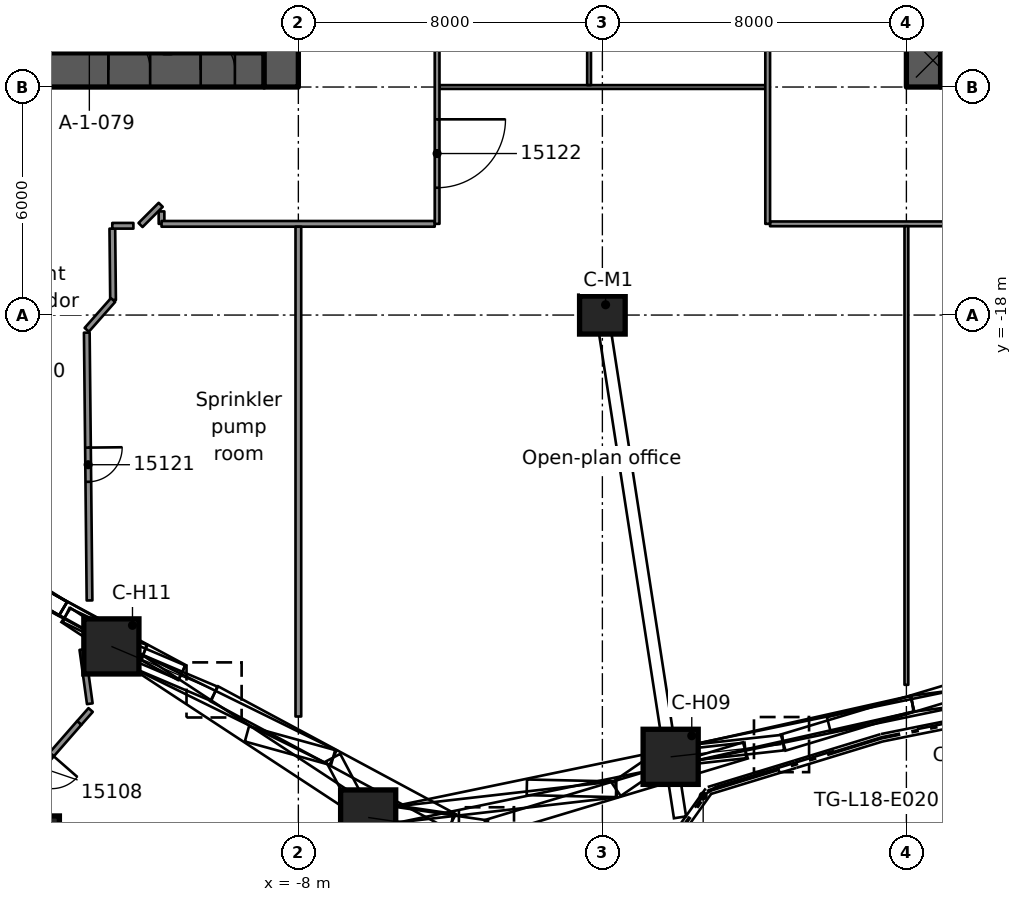
"""IFC4 building model, lengths in metres.
Left out: names, types, materials, properties, quantities, classifications, styles, units other than length and angle.
Written with IfcOpenShell. Run it as: python <this file> out.ifc"""

import sys

from ifc_helpers import new_model, si_unit, direction, frame, frame_2d, origin, origin_2d, place, context, subcontext, project, spatial, rectangle, extrude, element, fill, save


model = new_model("IFC4")
c1 = context("Model", 3, precision=1e-05, world=origin(), true_north=direction((0.0, 1.0)))
c2 = subcontext(c1, "Body", "Model", "MODEL_VIEW")
j1 = project(units=[si_unit("LENGTHUNIT", "METRE"), si_unit("PLANEANGLEUNIT", "RADIAN")], contexts=[c1])
p1 = place(None, origin())
s1 = spatial("IfcSite", under=j1, at=p1, CompositionType="ELEMENT")
p2 = place(p1, origin())
s2 = spatial("IfcBuilding", under=s1, at=p2, CompositionType="ELEMENT")
p3 = place(p2, frame((0.0, 0.0, 76.3)))
s3 = spatial("IfcBuildingStorey", under=s2, at=p3, CompositionType="ELEMENT", Elevation=76.3)
p4 = place(p3, frame((-18.1, -11.55, 0.0), z_axis=(0.0, 0.0, 1.0), x_axis=(1.0, 0.0, 0.0)))
e1 = element("IfcWall", 1, at=p4, inside=s3, PredefinedType="SHEAR", context=c2, shape_type="SweptSolid", body=[
    extrude(rectangle(XDim=9.2, YDim=0.9, at=frame_2d((4.6, 0.0))), origin(), (0.0, 0.0, 1.0), 4.4),
])
p5 = place(p4, frame((5.1, 0.0, 0.0)))
e2 = element("IfcOpeningElement", 2, at=p5, cuts=e1, PredefinedType="OPENING", context=c2, shape_type="SweptSolid", body=[
    extrude(rectangle(XDim=1.1, YDim=2.1, at=frame_2d((0.55, 1.05))), frame((0.0, 0.46, 0.0), z_axis=(0.0, -1.0, 0.0), x_axis=(1.0, 0.0, 0.0)), (0.0, 0.0, 1.0), 0.92),
])
p6 = place(p4, frame((7.53, 0.0, 0.0)))
e3 = element("IfcOpeningElement", 3, at=p6, cuts=e1, PredefinedType="OPENING", context=c2, shape_type="SweptSolid", body=[
    extrude(rectangle(XDim=0.9, YDim=2.1, at=frame_2d((0.45, 1.05))), frame((0.0, 0.46, 0.0), z_axis=(0.0, -1.0, 0.0), x_axis=(1.0, 0.0, 0.0)), (0.0, 0.0, 1.0), 0.92),
])
p7 = place(p3, frame((-8.45, -12.0, 0.0), z_axis=(0.0, 0.0, 1.0), x_axis=(0.0, 1.0, 0.0)))
e4 = element("IfcWall", 4, at=p7, inside=s3, PredefinedType="SHEAR", context=c2, shape_type="SweptSolid", body=[
    extrude(rectangle(XDim=24.0, YDim=0.9, at=frame_2d((12.0, 0.0))), origin(), (0.0, 0.0, 1.0), 4.4),
])
p8 = place(p7, frame((9.6, 0.0, 0.0)))
e5 = element("IfcOpeningElement", 5, at=p8, cuts=e4, PredefinedType="OPENING", context=c2, shape_type="SweptSolid", body=[
    extrude(rectangle(XDim=1.8, YDim=2.1, at=frame_2d((0.9, 1.05))), frame((0.0, 0.46, 0.0), z_axis=(0.0, -1.0, 0.0), x_axis=(1.0, 0.0, 0.0)), (0.0, 0.0, 1.0), 0.92),
])
p9 = place(p7, frame((5.9, 0.0, 0.0)))
e6 = element("IfcOpeningElement", 6, at=p9, cuts=e4, PredefinedType="OPENING", context=c2, shape_type="SweptSolid", body=[
    extrude(rectangle(XDim=1.8, YDim=2.1, at=frame_2d((0.9, 1.05))), frame((0.0, 0.46, 0.0), z_axis=(0.0, -1.0, 0.0), x_axis=(1.0, 0.0, 0.0)), (0.0, 0.0, 1.0), 0.92),
])
p10 = place(p7, frame((12.6, 0.0, 0.0)))
e7 = element("IfcOpeningElement", 7, at=p10, cuts=e4, PredefinedType="OPENING", context=c2, shape_type="SweptSolid", body=[
    extrude(rectangle(XDim=1.8, YDim=2.1, at=frame_2d((0.9, 1.05))), frame((0.0, 0.46, 0.0), z_axis=(0.0, -1.0, 0.0), x_axis=(1.0, 0.0, 0.0)), (0.0, 0.0, 1.0), 0.92),
])
p11 = place(p7, frame((19.65, 0.0, 0.0)))
e8 = element("IfcOpeningElement", 8, at=p11, cuts=e4, PredefinedType="OPENING", context=c2, shape_type="SweptSolid", body=[
    extrude(rectangle(XDim=1.1, YDim=2.1, at=frame_2d((0.55, 1.05))), frame((0.0, 0.46, 0.0), z_axis=(0.0, -1.0, 0.0), x_axis=(1.0, 0.0, 0.0)), (0.0, 0.0, 1.0), 0.92),
])
p12 = place(p7, frame((2.2, 0.0, 0.0)))
e9 = element("IfcOpeningElement", 9, at=p12, cuts=e4, PredefinedType="OPENING", context=c2, shape_type="SweptSolid", body=[
    extrude(rectangle(XDim=0.8, YDim=2.1, at=frame_2d((0.4, 1.05))), frame((0.0, 0.46, 0.0), z_axis=(0.0, -1.0, 0.0), x_axis=(1.0, 0.0, 0.0)), (0.0, 0.0, 1.0), 0.92),
])
p13 = place(p3, frame((8.9, -11.55, 0.0), z_axis=(0.0, 0.0, 1.0), x_axis=(1.0, 0.0, 0.0)))
e10 = element("IfcWall", 10, at=p13, inside=s3, PredefinedType="SHEAR", context=c2, shape_type="SweptSolid", body=[
    extrude(rectangle(XDim=9.2, YDim=0.9, at=frame_2d((4.6, 0.0))), origin(), (0.0, 0.0, 1.0), 4.4),
])
p14 = place(p13, frame((3.0, 0.0, 0.0)))
e11 = element("IfcOpeningElement", 11, at=p14, cuts=e10, PredefinedType="OPENING", context=c2, shape_type="SweptSolid", body=[
    extrude(rectangle(XDim=1.1, YDim=2.1, at=frame_2d((0.55, 1.05))), frame((0.0, 0.46, 0.0), z_axis=(0.0, -1.0, 0.0), x_axis=(1.0, 0.0, 0.0)), (0.0, 0.0, 1.0), 0.92),
])
p15 = place(p3, frame((8.45, -12.0, 0.0), z_axis=(0.0, 0.0, 1.0), x_axis=(0.0, 1.0, 0.0)))
e12 = element("IfcWall", 12, at=p15, inside=s3, PredefinedType="SHEAR", context=c2, shape_type="SweptSolid", body=[
    extrude(rectangle(XDim=24.0, YDim=0.9, at=frame_2d((12.0, 0.0))), origin(), (0.0, 0.0, 1.0), 4.4),
])
p16 = place(p15, frame((12.6, 0.0, 0.0)))
e13 = element("IfcOpeningElement", 13, at=p16, cuts=e12, PredefinedType="OPENING", context=c2, shape_type="SweptSolid", body=[
    extrude(rectangle(XDim=1.8, YDim=2.1, at=frame_2d((0.9, 1.05))), frame((0.0, 0.46, 0.0), z_axis=(0.0, -1.0, 0.0), x_axis=(1.0, 0.0, 0.0)), (0.0, 0.0, 1.0), 0.92),
])
p17 = place(p15, frame((16.3, 0.0, 0.0)))
e14 = element("IfcOpeningElement", 14, at=p17, cuts=e12, PredefinedType="OPENING", context=c2, shape_type="SweptSolid", body=[
    extrude(rectangle(XDim=1.8, YDim=2.1, at=frame_2d((0.9, 1.05))), frame((0.0, 0.46, 0.0), z_axis=(0.0, -1.0, 0.0), x_axis=(1.0, 0.0, 0.0)), (0.0, 0.0, 1.0), 0.92),
])
p18 = place(p15, frame((9.6, 0.0, 0.0)))
e15 = element("IfcOpeningElement", 15, at=p18, cuts=e12, PredefinedType="OPENING", context=c2, shape_type="SweptSolid", body=[
    extrude(rectangle(XDim=1.8, YDim=2.1, at=frame_2d((0.9, 1.05))), frame((0.0, 0.46, 0.0), z_axis=(0.0, -1.0, 0.0), x_axis=(1.0, 0.0, 0.0)), (0.0, 0.0, 1.0), 0.92),
])
p19 = place(p15, frame((3.25, 0.0, 0.0)))
e16 = element("IfcOpeningElement", 16, at=p19, cuts=e12, PredefinedType="OPENING", context=c2, shape_type="SweptSolid", body=[
    extrude(rectangle(XDim=1.1, YDim=2.1, at=frame_2d((0.55, 1.05))), frame((0.0, 0.46, 0.0), z_axis=(0.0, -1.0, 0.0), x_axis=(1.0, 0.0, 0.0)), (0.0, 0.0, 1.0), 0.92),
])
p20 = place(p15, frame((21.0, 0.0, 0.0)))
e17 = element("IfcOpeningElement", 17, at=p20, cuts=e12, PredefinedType="OPENING", context=c2, shape_type="SweptSolid", body=[
    extrude(rectangle(XDim=0.8, YDim=2.1, at=frame_2d((0.4, 1.05))), frame((0.0, 0.46, 0.0), z_axis=(0.0, -1.0, 0.0), x_axis=(1.0, 0.0, 0.0)), (0.0, 0.0, 1.0), 0.92),
])
p21 = place(p3, frame((-15.013, -31.905, 0.515), z_axis=(0.552011288363, -0.446963412702, 0.703922755156), x_axis=(0.629280838232, 0.777177989031, 0.0)))
e18 = element("IfcColumn", 18, at=p21, inside=s3, PredefinedType="COLUMN", context=c2, shape_type="SweptSolid", body=[
    extrude(rectangle(XDim=1.45, YDim=1.45, at=origin_2d()), origin(), (0.0, 0.0, 1.0), 4.788),
])
p22 = place(p3, frame((1.797, -29.624, 0.469), z_axis=(0.642678137038, 0.070948481985, 0.762844102735), x_axis=(-0.1097284362, 0.993961604032, 0.0)))
e19 = element("IfcColumn", 19, at=p22, inside=s3, PredefinedType="COLUMN", context=c2, shape_type="SweptSolid", body=[
    extrude(rectangle(XDim=1.45, YDim=1.45, at=origin_2d()), origin(), (0.0, 0.0, 1.0), 4.539),
])
p23 = place(p3, frame((-6.163, -31.22, 0.491), z_axis=(0.670106023434, -0.098169402539, 0.735744986909), x_axis=(0.144951118407, 0.989438817347, 0.0)))
e20 = element("IfcColumn", 20, at=p23, inside=s3, PredefinedType="COLUMN", context=c2, shape_type="SweptSolid", body=[
    extrude(rectangle(XDim=1.45, YDim=1.45, at=origin_2d()), origin(), (0.0, 0.0, 1.0), 4.646),
])
p24 = place(p3, frame((-12.92, -26.719, 0.469), z_axis=(0.595306617304, -0.252280476656, 0.762866038366), x_axis=(0.390190875101, 0.920733990351, 0.0)))
e21 = element("IfcColumn", 21, at=p24, inside=s3, PredefinedType="COLUMN", context=c2, shape_type="SweptSolid", body=[
    extrude(rectangle(XDim=1.45, YDim=1.45, at=origin_2d()), origin(), (0.0, 0.0, 1.0), 4.539),
])
p25 = place(p3, frame((0.0, -18.0, 0.0), z_axis=(0.0, 0.0, 1.0), x_axis=(1.0, 0.0, 0.0)))
e22 = element("IfcColumn", 22, at=p25, inside=s3, PredefinedType="COLUMN", context=c2, shape_type="SweptSolid", body=[
    extrude(rectangle(XDim=1.2, YDim=1.0, at=origin_2d()), origin(), (0.0, 0.0, 1.0), 4.4),
])
p26 = place(p3, frame((-11.44, -11.1, 0.0), z_axis=(0.0, 0.0, 1.0), x_axis=(0.0, 1.0, 0.0)))
e23 = element("IfcWall", 23, at=p26, inside=s3, PredefinedType="SOLIDWALL", context=c2, shape_type="SweptSolid", body=[
    extrude(rectangle(XDim=4.125, YDim=0.2, at=frame_2d((2.062, 0.0))), origin(), (0.0, 0.0, 1.0), 3.99),
])
p27 = place(p3, frame((-11.601, -15.273, 0.0), z_axis=(0.0, 0.0, 1.0), x_axis=(0.002985061327, -0.999995544695, 0.0)))
e24 = element("IfcWall", 24, at=p27, inside=s3, PredefinedType="PARTITIONING", context=c2, shape_type="SweptSolid", body=[
    extrude(rectangle(XDim=0.327, YDim=0.15, at=frame_2d((0.164, 0.0))), origin(), (0.0, 0.0, 1.0), 3.98),
])
p28 = place(p3, frame((-13.567, -18.463, 0.0), z_axis=(0.0, 0.0, 1.0), x_axis=(0.010186228717, -0.999948119026, 0.0)))
e25 = element("IfcWall", 25, at=p28, inside=s3, PredefinedType="PARTITIONING", context=c2, shape_type="SweptSolid", body=[
    extrude(rectangle(XDim=7.046, YDim=0.15, at=frame_2d((3.523, 0.0))), origin(), (0.0, 0.0, 1.0), 3.98),
])
p29 = place(p28, frame((3.025, 0.0, 0.0)))
e26 = element("IfcOpeningElement", 26, at=p29, cuts=e25, PredefinedType="OPENING", context=c2, shape_type="SweptSolid", body=[
    extrude(rectangle(XDim=0.9, YDim=2.1, at=frame_2d((0.45, 1.05))), frame((0.0, 0.085, 0.0), z_axis=(0.0, -1.0, 0.0), x_axis=(1.0, 0.0, 0.0)), (0.0, 0.0, 1.0), 0.17),
])
p30 = place(p3, frame((-13.488, -28.227, 0.0), z_axis=(0.0, 0.0, 1.0), x_axis=(-0.136103974412, 0.990694558453, 0.0)))
e27 = element("IfcWall", 27, at=p30, inside=s3, PredefinedType="PARTITIONING", context=c2, shape_type="SweptSolid", body=[
    extrude(rectangle(XDim=1.44, YDim=0.15, at=frame_2d((0.72, 0.0))), origin(), (0.0, 0.0, 1.0), 3.98),
])
p31 = place(p3, frame((-12.895, -15.726, 0.0), z_axis=(0.0, 0.0, 1.0), x_axis=(0.01013461463, -0.999948643474, 0.0)))
e28 = element("IfcWall", 28, at=p31, inside=s3, PredefinedType="PARTITIONING", context=c2, shape_type="SweptSolid", body=[
    extrude(rectangle(XDim=1.879, YDim=0.15, at=frame_2d((0.939, 0.0))), origin(), (0.0, 0.0, 1.0), 3.98),
])
p32 = place(p3, frame((-12.896, -15.651, 0.0), z_axis=(0.0, 0.0, 1.0), x_axis=(1.0, 0.0, 0.0)))
e29 = element("IfcWall", 29, at=p32, inside=s3, PredefinedType="PARTITIONING", context=c2, shape_type="SweptSolid", body=[
    extrude(rectangle(XDim=0.555, YDim=0.15, at=frame_2d((0.277, 0.0))), origin(), (0.0, 0.0, 1.0), 3.98),
])
p33 = place(p3, frame((-11.6, -15.6, 0.0), z_axis=(0.0, 0.0, 1.0), x_axis=(1.0, 0.0, 0.0)))
e30 = element("IfcWall", 30, at=p33, inside=s3, PredefinedType="PARTITIONING", context=c2, shape_type="SweptSolid", body=[
    extrude(rectangle(XDim=7.188, YDim=0.15, at=frame_2d((3.594, 0.0))), origin(), (0.0, 0.0, 1.0), 3.98),
])
p34 = place(p3, frame((4.412, -15.6, 0.0), z_axis=(0.0, 0.0, 1.0), x_axis=(1.0, 0.0, 0.0)))
e31 = element("IfcWall", 31, at=p34, inside=s3, PredefinedType="PARTITIONING", context=c2, shape_type="SweptSolid", body=[
    extrude(rectangle(XDim=7.127, YDim=0.125, at=frame_2d((3.563, 0.0))), origin(), (0.0, 0.0, 1.0), 3.98),
])
p35 = place(p3, frame((-4.287, -12.0, 0.0), z_axis=(0.0, 0.0, 1.0), x_axis=(1.0, 0.0, 0.0)))
e32 = element("IfcWall", 32, at=p35, inside=s3, PredefinedType="PARTITIONING", context=c2, shape_type="SweptSolid", body=[
    extrude(rectangle(XDim=8.574, YDim=0.1, at=frame_2d((4.287, 0.0))), origin(), (0.0, 0.0, 1.0), 3.98),
])
p36 = place(p3, frame((-13.568, -18.388, 0.0), z_axis=(0.0, 0.0, 1.0), x_axis=(0.66231676266, 0.749223935749, 0.0)))
e33 = element("IfcWall", 33, at=p36, inside=s3, PredefinedType="PARTITIONING", context=c2, shape_type="SweptSolid", body=[
    extrude(rectangle(XDim=1.045, YDim=0.15, at=frame_2d((0.522, 0.0))), origin(), (0.0, 0.0, 1.0), 3.98),
])
p37 = place(p3, frame((-12.153, -15.631, 0.0), z_axis=(0.0, 0.0, 1.0), x_axis=(0.707106781187, 0.707106781187, 0.0)))
e34 = element("IfcWall", 34, at=p37, inside=s3, PredefinedType="PARTITIONING", context=c2, shape_type="SweptSolid", body=[
    extrude(rectangle(XDim=0.751, YDim=0.15, at=frame_2d((0.375, 0.0))), origin(), (0.0, 0.0, 1.0), 3.98),
])
p38 = place(p3, frame((-13.767, -28.734, 0.0), z_axis=(0.0, 0.0, 1.0), x_axis=(0.660929934511, 0.750447614206, 0.0)))
e35 = element("IfcWall", 35, at=p38, inside=s3, PredefinedType="PARTITIONING", context=c2, shape_type="SweptSolid", body=[
    extrude(rectangle(XDim=0.456, YDim=0.15, at=frame_2d((0.228, 0.0))), origin(), (0.0, 0.0, 1.0), 3.98),
])
p39 = place(p3, frame((-13.766, -28.732, 0.0), z_axis=(0.0, 0.0, 1.0), x_axis=(-0.658218220516, -0.752827187461, 0.0)))
e36 = element("IfcWall", 36, at=p39, inside=s3, PredefinedType="PARTITIONING", context=c2, shape_type="SweptSolid", body=[
    extrude(rectangle(XDim=24.809, YDim=0.15, at=frame_2d((12.405, 0.0))), origin(), (0.0, 0.0, 1.0), 3.98),
])
p40 = place(p39, frame((1.103, 0.0, 0.0)))
e37 = element("IfcOpeningElement", 37, at=p40, cuts=e36, PredefinedType="OPENING", context=c2, shape_type="SweptSolid", body=[
    extrude(rectangle(XDim=0.9, YDim=2.1, at=frame_2d((0.45, 1.05))), frame((0.0, 0.085, 0.0), z_axis=(0.0, -1.0, 0.0), x_axis=(1.0, 0.0, 0.0)), (0.0, 0.0, 1.0), 0.17),
])
p41 = place(p39, frame((8.71, 0.0, 0.0)))
e38 = element("IfcOpeningElement", 38, at=p41, cuts=e36, PredefinedType="OPENING", context=c2, shape_type="SweptSolid", body=[
    extrude(rectangle(XDim=0.9, YDim=2.1, at=frame_2d((0.45, 1.05))), frame((0.0, 0.085, 0.0), z_axis=(0.0, -1.0, 0.0), x_axis=(1.0, 0.0, 0.0)), (0.0, 0.0, 1.0), 0.17),
])
p42 = place(p39, frame((14.759, 0.0, 0.0)))
e39 = element("IfcOpeningElement", 39, at=p42, cuts=e36, PredefinedType="OPENING", context=c2, shape_type="SweptSolid", body=[
    extrude(rectangle(XDim=0.9, YDim=2.1, at=frame_2d((0.45, 1.05))), frame((0.0, 0.085, 0.0), z_axis=(0.0, -1.0, 0.0), x_axis=(1.0, 0.0, 0.0)), (0.0, 0.0, 1.0), 0.17),
])
p43 = place(p39, frame((21.709, 0.0, 0.0)))
e40 = element("IfcOpeningElement", 40, at=p43, cuts=e36, PredefinedType="OPENING", context=c2, shape_type="SweptSolid", body=[
    extrude(rectangle(XDim=0.9, YDim=2.1, at=frame_2d((0.45, 1.05))), frame((0.0, 0.085, 0.0), z_axis=(0.0, -1.0, 0.0), x_axis=(1.0, 0.0, 0.0)), (0.0, 0.0, 1.0), 0.17),
])
p44 = place(p3, frame((8.0, -27.729, 0.0), z_axis=(0.0, 0.0, 1.0), x_axis=(0.0, 1.0, 0.0)))
e41 = element("IfcWall", 41, at=p44, inside=s3, PredefinedType="PARTITIONING", context=c2, shape_type="SweptSolid", body=[
    extrude(rectangle(XDim=12.067, YDim=0.1, at=frame_2d((6.033, 0.0))), origin(), (0.0, 0.0, 1.0), 3.98),
])
p45 = place(p3, frame((4.35, -15.6, 0.0), z_axis=(0.0, 0.0, 1.0), x_axis=(0.0, 1.0, 0.0)))
e42 = element("IfcWall", 42, at=p45, inside=s3, PredefinedType="PARTITIONING", context=c2, shape_type="SweptSolid", body=[
    extrude(rectangle(XDim=31.201, YDim=0.125, at=frame_2d((15.601, 0.0))), origin(), (0.0, 0.0, 1.0), 3.98),
])
p46 = place(p45, frame((11.7, 0.0, 0.0)))
e43 = element("IfcOpeningElement", 43, at=p46, cuts=e42, PredefinedType="OPENING", context=c2, shape_type="SweptSolid", body=[
    extrude(rectangle(XDim=1.8, YDim=2.1, at=frame_2d((0.9, 1.05))), frame((0.0, 0.073, 0.0), z_axis=(0.0, -1.0, 0.0), x_axis=(1.0, 0.0, 0.0)), (0.0, 0.0, 1.0), 0.145),
])
p47 = place(p45, frame((23.95, 0.0, 0.0)))
e44 = element("IfcOpeningElement", 44, at=p47, cuts=e42, PredefinedType="OPENING", context=c2, shape_type="SweptSolid", body=[
    extrude(rectangle(XDim=1.1, YDim=2.1, at=frame_2d((0.55, 1.05))), frame((0.0, 0.073, 0.0), z_axis=(0.0, -1.0, 0.0), x_axis=(1.0, 0.0, 0.0)), (0.0, 0.0, 1.0), 0.145),
])
p48 = place(p3, frame((-0.35, -11.95, 0.0), z_axis=(0.0, 0.0, 1.0), x_axis=(0.0, 1.0, 0.0)))
e45 = element("IfcWall", 45, at=p48, inside=s3, PredefinedType="PARTITIONING", context=c2, shape_type="SweptSolid", body=[
    extrude(rectangle(XDim=5.95, YDim=0.1, at=frame_2d((2.975, 0.0))), origin(), (0.0, 0.0, 1.0), 3.98),
])
p49 = place(p3, frame((-4.349, 15.6, 0.0), z_axis=(0.0, 0.0, 1.0), x_axis=(0.0, -1.0, 0.0)))
e46 = element("IfcWall", 46, at=p49, inside=s3, PredefinedType="PARTITIONING", context=c2, shape_type="SweptSolid", body=[
    extrude(rectangle(XDim=31.2, YDim=0.125, at=frame_2d((15.6, 0.0))), origin(), (0.0, 0.0, 1.0), 3.98),
])
p50 = place(p49, frame((28.45, 0.0, 0.0)))
e47 = element("IfcOpeningElement", 47, at=p50, cuts=e46, PredefinedType="OPENING", context=c2, shape_type="SweptSolid", body=[
    extrude(rectangle(XDim=1.8, YDim=2.1, at=frame_2d((0.9, 1.05))), frame((0.0, 0.073, 0.0), z_axis=(0.0, -1.0, 0.0), x_axis=(1.0, 0.0, 0.0)), (0.0, 0.0, 1.0), 0.145),
])
p51 = place(p49, frame((0.85, 0.0, 0.0)))
e48 = element("IfcOpeningElement", 48, at=p51, cuts=e46, PredefinedType="OPENING", context=c2, shape_type="SweptSolid", body=[
    extrude(rectangle(XDim=1.8, YDim=2.1, at=frame_2d((0.9, 1.05))), frame((0.0, 0.073, 0.0), z_axis=(0.0, -1.0, 0.0), x_axis=(1.0, 0.0, 0.0)), (0.0, 0.0, 1.0), 0.145),
])
p52 = place(p49, frame((24.2, 0.0, 0.0)))
e49 = element("IfcOpeningElement", 49, at=p52, cuts=e46, PredefinedType="OPENING", context=c2, shape_type="SweptSolid", body=[
    extrude(rectangle(XDim=0.9, YDim=2.1, at=frame_2d((0.45, 1.05))), frame((0.0, 0.073, 0.0), z_axis=(0.0, -1.0, 0.0), x_axis=(1.0, 0.0, 0.0)), (0.0, 0.0, 1.0), 0.145),
])
p53 = place(p3, frame((-8.0, -28.563, 0.0), z_axis=(0.0, 0.0, 1.0), x_axis=(0.0, 1.0, 0.0)))
e50 = element("IfcWall", 50, at=p53, inside=s3, PredefinedType="PARTITIONING", context=c2, shape_type="SweptSolid", body=[
    extrude(rectangle(XDim=12.888, YDim=0.15, at=frame_2d((6.444, 0.0))), origin(), (0.0, 0.0, 1.0), 3.98),
])
p54 = place(p5, origin())
e51 = element("IfcDoor", 51, at=p54, inside=s3, OperationType="SINGLE_SWING_RIGHT", PredefinedType="DOOR", context=c2, shape_type="SweptSolid", body=[
    extrude(rectangle(XDim=1.1, YDim=2.1, at=frame_2d((0.55, 1.05))), frame((0.0, 0.025, 0.0), z_axis=(0.0, -1.0, 0.0), x_axis=(1.0, 0.0, 0.0)), (0.0, 0.0, 1.0), 0.05),
])
fill(e2, e51)
p55 = place(p6, origin())
e52 = element("IfcDoor", 52, at=p55, inside=s3, OperationType="SINGLE_SWING_RIGHT", PredefinedType="DOOR", context=c2, shape_type="SweptSolid", body=[
    extrude(rectangle(XDim=0.9, YDim=2.1, at=frame_2d((0.45, 1.05))), frame((0.0, 0.025, 0.0), z_axis=(0.0, -1.0, 0.0), x_axis=(1.0, 0.0, 0.0)), (0.0, 0.0, 1.0), 0.05),
])
fill(e3, e52)
p56 = place(p40, origin())
e53 = element("IfcDoor", 53, at=p56, inside=s3, OperationType="SINGLE_SWING_LEFT", PredefinedType="DOOR", context=c2, shape_type="SweptSolid", body=[
    extrude(rectangle(XDim=0.9, YDim=2.1, at=frame_2d((0.45, 1.05))), frame((0.0, 0.025, 0.0), z_axis=(0.0, -1.0, 0.0), x_axis=(1.0, 0.0, 0.0)), (0.0, 0.0, 1.0), 0.05),
])
fill(e37, e53)
p57 = place(p29, origin())
e54 = element("IfcDoor", 54, at=p57, inside=s3, OperationType="SINGLE_SWING_LEFT", PredefinedType="DOOR", context=c2, shape_type="SweptSolid", body=[
    extrude(rectangle(XDim=0.9, YDim=2.1, at=frame_2d((0.45, 1.05))), frame((0.0, 0.025, 0.0), z_axis=(0.0, -1.0, 0.0), x_axis=(1.0, 0.0, 0.0)), (0.0, 0.0, 1.0), 0.05),
])
fill(e26, e54)
p58 = place(p50, origin())
e55 = element("IfcDoor", 55, at=p58, inside=s3, OperationType="DOUBLE_DOOR_SINGLE_SWING", PredefinedType="DOOR", context=c2, shape_type="SweptSolid", body=[
    extrude(rectangle(XDim=1.8, YDim=2.1, at=frame_2d((0.9, 1.05))), frame((0.0, 0.025, 0.0), z_axis=(0.0, -1.0, 0.0), x_axis=(1.0, 0.0, 0.0)), (0.0, 0.0, 1.0), 0.05),
])
fill(e47, e55)
save(model, sys.argv[1])
